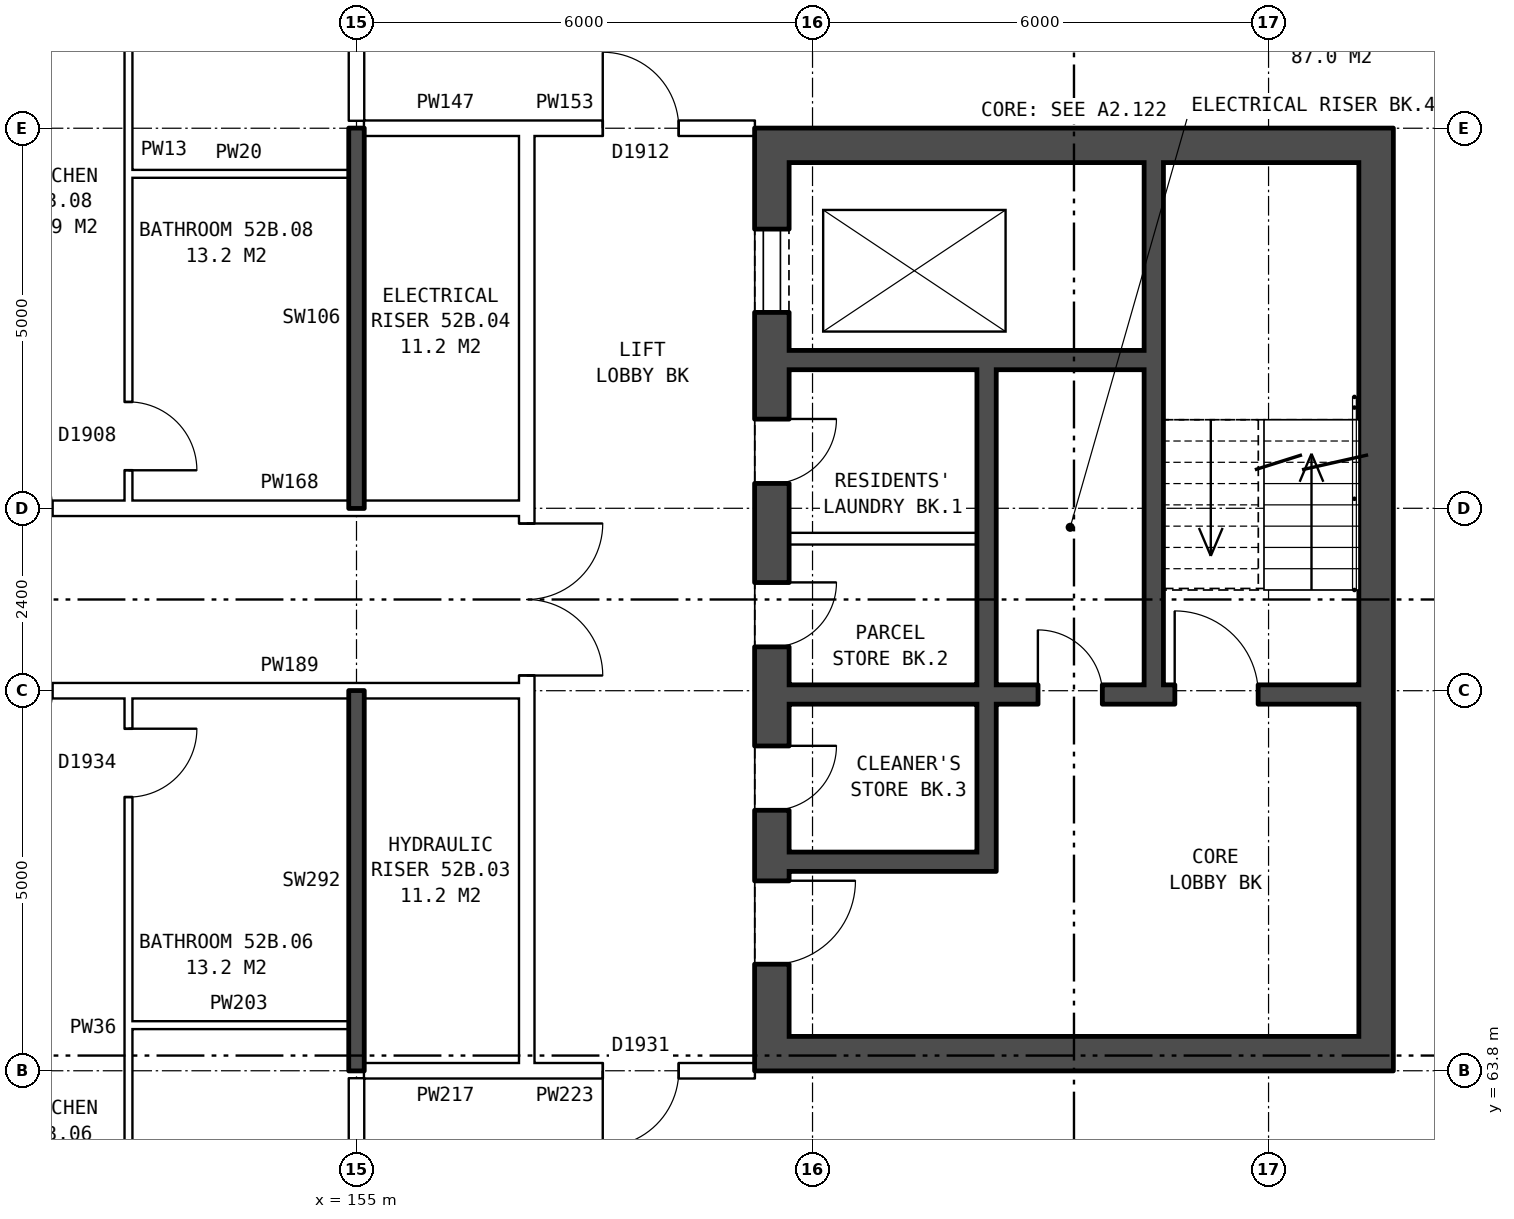
"""IFC4 building model, lengths in metres.
Left out: names, types, materials, properties, quantities, classifications, styles, units other than length and angle.
Written with IfcOpenShell. Run it as: python <this file> out.ifc"""

import sys

from ifc_helpers import new_model, si_unit, direction, frame, frame_2d, origin, place, context, subcontext, project, spatial, rectangle, extrude, element, fill, save


model = new_model("IFC4")
c1 = context("Model", 3, precision=1e-05, world=origin(), true_north=direction((0.0, 1.0)))
c2 = subcontext(c1, "Body", "Model", "MODEL_VIEW")
j1 = project(units=[si_unit("LENGTHUNIT", "METRE"), si_unit("PLANEANGLEUNIT", "RADIAN")], contexts=[c1])
p1 = place(None, origin())
s1 = spatial("IfcSite", under=j1, at=p1, CompositionType="ELEMENT")
p2 = place(p1, origin())
s2 = spatial("IfcBuilding", under=s1, at=p2, CompositionType="ELEMENT")
p3 = place(p2, frame((0.0, 0.0, 185.1)))
s3 = spatial("IfcBuildingStorey", under=s2, at=p3, CompositionType="ELEMENT", Elevation=185.1)
p4 = place(p3, frame((160.465, 76.2, 0.0), z_axis=(0.0, 0.0, 1.0), x_axis=(0.0, -1.0, 0.0)))
e1 = element("IfcWall", 1, at=p4, inside=s3, PredefinedType="SHEAR", context=c2, shape_type="SweptSolid", body=[
    extrude(rectangle(XDim=12.4, YDim=0.45, at=frame_2d((6.2, 0.0))), origin(), (0.0, 0.0, 1.0), 2.85),
])
p5 = place(p4, frame((1.325, 0.0, 0.0)))
e2 = element("IfcOpeningElement", 2, at=p5, cuts=e1, PredefinedType="OPENING", context=c2, shape_type="SweptSolid", body=[
    extrude(rectangle(XDim=1.1, YDim=2.1, at=frame_2d((0.55, 1.05))), frame((0.0, 0.235, 0.0), z_axis=(0.0, -1.0, 0.0), x_axis=(1.0, 0.0, 0.0)), (0.0, 0.0, 1.0), 0.47),
])
p6 = place(p4, frame((3.825, 0.0, 0.0)))
e3 = element("IfcOpeningElement", 3, at=p6, cuts=e1, PredefinedType="OPENING", context=c2, shape_type="SweptSolid", body=[
    extrude(rectangle(XDim=0.85, YDim=2.1, at=frame_2d((0.425, 1.05))), frame((0.0, 0.235, 0.0), z_axis=(0.0, -1.0, 0.0), x_axis=(1.0, 0.0, 0.0)), (0.0, 0.0, 1.0), 0.47),
])
p7 = place(p4, frame((5.975, 0.0, 0.0)))
e4 = element("IfcOpeningElement", 4, at=p7, cuts=e1, PredefinedType="OPENING", context=c2, shape_type="SweptSolid", body=[
    extrude(rectangle(XDim=0.85, YDim=2.1, at=frame_2d((0.425, 1.05))), frame((0.0, 0.235, 0.0), z_axis=(0.0, -1.0, 0.0), x_axis=(1.0, 0.0, 0.0)), (0.0, 0.0, 1.0), 0.47),
])
p8 = place(p4, frame((9.9, 0.0, 0.0)))
e5 = element("IfcOpeningElement", 5, at=p8, cuts=e1, PredefinedType="OPENING", context=c2, shape_type="SweptSolid", body=[
    extrude(rectangle(XDim=1.1, YDim=2.1, at=frame_2d((0.55, 1.05))), frame((0.0, 0.235, 0.0), z_axis=(0.0, -1.0, 0.0), x_axis=(1.0, 0.0, 0.0)), (0.0, 0.0, 1.0), 0.47),
])
p9 = place(p4, frame((8.125, 0.0, 0.0)))
e6 = element("IfcOpeningElement", 6, at=p9, cuts=e1, PredefinedType="OPENING", context=c2, shape_type="SweptSolid", body=[
    extrude(rectangle(XDim=0.85, YDim=2.1, at=frame_2d((0.425, 1.05))), frame((0.0, 0.235, 0.0), z_axis=(0.0, -1.0, 0.0), x_axis=(1.0, 0.0, 0.0)), (0.0, 0.0, 1.0), 0.47),
])
p10 = place(p3, frame((168.415, 76.2, 0.0), z_axis=(0.0, 0.0, 1.0), x_axis=(0.0, -1.0, 0.0)))
e7 = element("IfcWall", 7, at=p10, inside=s3, PredefinedType="SHEAR", context=c2, shape_type="SweptSolid", body=[
    extrude(rectangle(XDim=12.4, YDim=0.45, at=frame_2d((6.2, 0.0))), origin(), (0.0, 0.0, 1.0), 2.85),
])
for number, where, z_axis, x_axis in (
    (8, (160.69, 75.975, 0.0), (0.0, 0.0, 1.0), (1.0, 0.0, 0.0)),
    (9, (160.69, 64.025, 0.0), (0.0, 0.0, 1.0), (1.0, 0.0, 0.0)),
):
    element("IfcWall", number, at=place(p3, frame(where, z_axis=z_axis, x_axis=x_axis)), inside=s3, PredefinedType="SHEAR", context=c2, shape_type="SweptSolid", body=[
        extrude(rectangle(XDim=7.5, YDim=0.45, at=frame_2d((3.75, 0.0))), origin(), (0.0, 0.0, 1.0), 2.85),
    ])
p11 = place(p3, frame((160.69, 73.15, 0.0), z_axis=(0.0, 0.0, 1.0), x_axis=(1.0, 0.0, 0.0)))
e10 = element("IfcWall", 10, at=p11, inside=s3, PredefinedType="SHEAR", context=c2, shape_type="SweptSolid", body=[
    extrude(rectangle(XDim=4.675, YDim=0.25, at=frame_2d((2.337, 0.0))), origin(), (0.0, 0.0, 1.0), 2.85),
])
p12 = place(p3, frame((160.69, 70.8, 0.0), z_axis=(0.0, 0.0, 1.0), x_axis=(1.0, 0.0, 0.0)))
e11 = element("IfcWall", 11, at=p12, inside=s3, PredefinedType="PARTITIONING", context=c2, shape_type="SweptSolid", body=[
    extrude(rectangle(XDim=2.475, YDim=0.15, at=frame_2d((1.238, 0.0))), origin(), (0.0, 0.0, 1.0), 2.85),
])
p13 = place(p3, frame((160.69, 68.75, 0.0), z_axis=(0.0, 0.0, 1.0), x_axis=(1.0, 0.0, 0.0)))
e12 = element("IfcWall", 12, at=p13, inside=s3, PredefinedType="SHEAR", context=c2, shape_type="SweptSolid", body=[
    extrude(rectangle(XDim=7.5, YDim=0.25, at=frame_2d((3.75, 0.0))), origin(), (0.0, 0.0, 1.0), 2.85),
])
p14 = place(p13, frame((5.075, 0.0, 0.0)))
e13 = element("IfcOpeningElement", 13, at=p14, cuts=e12, PredefinedType="OPENING", context=c2, shape_type="SweptSolid", body=[
    extrude(rectangle(XDim=1.1, YDim=2.1, at=frame_2d((0.55, 1.05))), frame((0.0, 0.135, 0.0), z_axis=(0.0, -1.0, 0.0), x_axis=(1.0, 0.0, 0.0)), (0.0, 0.0, 1.0), 0.27),
])
p15 = place(p13, frame((3.275, 0.0, 0.0)))
e14 = element("IfcOpeningElement", 14, at=p15, cuts=e12, PredefinedType="OPENING", context=c2, shape_type="SweptSolid", body=[
    extrude(rectangle(XDim=0.85, YDim=2.1, at=frame_2d((0.425, 1.05))), frame((0.0, 0.135, 0.0), z_axis=(0.0, -1.0, 0.0), x_axis=(1.0, 0.0, 0.0)), (0.0, 0.0, 1.0), 0.27),
])
p16 = place(p3, frame((160.69, 66.55, 0.0), z_axis=(0.0, 0.0, 1.0), x_axis=(1.0, 0.0, 0.0)))
e15 = element("IfcWall", 15, at=p16, inside=s3, PredefinedType="SHEAR", context=c2, shape_type="SweptSolid", body=[
    extrude(rectangle(XDim=2.475, YDim=0.25, at=frame_2d((1.238, 0.0))), origin(), (0.0, 0.0, 1.0), 2.85),
])
p17 = place(p3, frame((163.29, 73.025, 0.0), z_axis=(0.0, 0.0, 1.0), x_axis=(0.0, -1.0, 0.0)))
e16 = element("IfcWall", 16, at=p17, inside=s3, PredefinedType="SHEAR", context=c2, shape_type="SweptSolid", body=[
    extrude(rectangle(XDim=4.15, YDim=0.25, at=frame_2d((2.075, 0.0))), origin(), (0.0, 0.0, 1.0), 2.85),
])
p18 = place(p3, frame((163.29, 68.625, 0.0), z_axis=(0.0, 0.0, 1.0), x_axis=(0.0, -1.0, 0.0)))
e17 = element("IfcWall", 17, at=p18, inside=s3, PredefinedType="SHEAR", context=c2, shape_type="SweptSolid", body=[
    extrude(rectangle(XDim=2.2, YDim=0.25, at=frame_2d((1.1, 0.0))), origin(), (0.0, 0.0, 1.0), 2.85),
])
p19 = place(p3, frame((165.49, 75.75, 0.0), z_axis=(0.0, 0.0, 1.0), x_axis=(0.0, -1.0, 0.0)))
e18 = element("IfcWall", 18, at=p19, inside=s3, PredefinedType="SHEAR", context=c2, shape_type="SweptSolid", body=[
    extrude(rectangle(XDim=6.875, YDim=0.25, at=frame_2d((3.438, 0.0))), origin(), (0.0, 0.0, 1.0), 2.85),
])
p20 = place(p3, frame((157.24, 63.9, 0.0), z_axis=(0.0, 0.0, 1.0), x_axis=(0.0, 1.0, 0.0)))
e19 = element("IfcWall", 19, at=p20, inside=s3, PredefinedType="PARTITIONING", context=c2, shape_type="SweptSolid", body=[
    extrude(rectangle(XDim=12.2, YDim=0.2, at=frame_2d((6.1, 0.0))), origin(), (0.0, 0.0, 1.0), 2.85),
])
p21 = place(p20, frame((5.1, 0.0, 0.0)))
e20 = element("IfcOpeningElement", 20, at=p21, cuts=e19, PredefinedType="OPENING", context=c2, shape_type="SweptSolid", body=[
    extrude(rectangle(XDim=2.0, YDim=2.1, at=frame_2d((1.0, 1.05))), frame((0.0, 0.11, 0.0), z_axis=(0.0, -1.0, 0.0), x_axis=(1.0, 0.0, 0.0)), (0.0, 0.0, 1.0), 0.22),
])
p22 = place(p3, frame((155.1, 63.8, 0.0), z_axis=(0.0, 0.0, 1.0), x_axis=(1.0, 0.0, 0.0)))
e21 = element("IfcWall", 21, at=p22, inside=s3, PredefinedType="PARTITIONING", context=c2, shape_type="SweptSolid", body=[
    extrude(rectangle(XDim=2.14, YDim=0.2, at=frame_2d((1.07, 0.0))), origin(), (0.0, 0.0, 1.0), 2.85),
])
p23 = place(p3, frame((157.24, 63.8, 0.0), z_axis=(0.0, 0.0, 1.0), x_axis=(1.0, 0.0, 0.0)))
e22 = element("IfcWall", 22, at=p23, inside=s3, PredefinedType="PARTITIONING", context=c2, shape_type="SweptSolid", body=[
    extrude(rectangle(XDim=3.0, YDim=0.2, at=frame_2d((1.5, 0.0))), origin(), (0.0, 0.0, 1.0), 2.85),
])
p24 = place(p23, frame((1.0, 0.0, 0.0)))
e23 = element("IfcOpeningElement", 23, at=p24, cuts=e22, PredefinedType="OPENING", context=c2, shape_type="SweptSolid", body=[
    extrude(rectangle(XDim=1.0, YDim=2.1, at=frame_2d((0.5, 1.05))), frame((0.0, 0.11, 0.0), z_axis=(0.0, -1.0, 0.0), x_axis=(1.0, 0.0, 0.0)), (0.0, 0.0, 1.0), 0.22),
])
p25 = place(p3, frame((152.0, 64.4, 0.0), z_axis=(0.0, 0.0, 1.0), x_axis=(1.0, 0.0, 0.0)))
e24 = element("IfcWall", 24, at=p25, inside=s3, PredefinedType="PARTITIONING", context=c2, shape_type="SweptSolid", body=[
    extrude(rectangle(XDim=2.9, YDim=0.1, at=frame_2d((1.45, 0.0))), origin(), (0.0, 0.0, 1.0), 2.85),
])
p26 = place(p3, frame((142.76, 68.8, 0.0), z_axis=(0.0, 0.0, 1.0), x_axis=(1.0, 0.0, 0.0)))
e25 = element("IfcWall", 25, at=p26, inside=s3, PredefinedType="PARTITIONING", context=c2, shape_type="SweptSolid", body=[
    extrude(rectangle(XDim=14.48, YDim=0.2, at=frame_2d((7.24, 0.0))), origin(), (0.0, 0.0, 1.0), 2.85),
])
p27 = place(p26, frame((1.12, 0.0, 0.0)))
e26 = element("IfcOpeningElement", 26, at=p27, cuts=e25, PredefinedType="OPENING", context=c2, shape_type="SweptSolid", body=[
    extrude(rectangle(XDim=1.0, YDim=2.1, at=frame_2d((0.5, 1.05))), frame((0.0, 0.11, 0.0), z_axis=(0.0, -1.0, 0.0), x_axis=(1.0, 0.0, 0.0)), (0.0, 0.0, 1.0), 0.22),
])
p28 = place(p26, frame((7.24, 0.0, 0.0)))
e27 = element("IfcOpeningElement", 27, at=p28, cuts=e25, PredefinedType="OPENING", context=c2, shape_type="SweptSolid", body=[
    extrude(rectangle(XDim=1.0, YDim=2.1, at=frame_2d((0.5, 1.05))), frame((0.0, 0.11, 0.0), z_axis=(0.0, -1.0, 0.0), x_axis=(1.0, 0.0, 0.0)), (0.0, 0.0, 1.0), 0.22),
])
p29 = place(p3, frame((142.76, 71.2, 0.0), z_axis=(0.0, 0.0, 1.0), x_axis=(1.0, 0.0, 0.0)))
e28 = element("IfcWall", 28, at=p29, inside=s3, PredefinedType="PARTITIONING", context=c2, shape_type="SweptSolid", body=[
    extrude(rectangle(XDim=14.48, YDim=0.2, at=frame_2d((7.24, 0.0))), origin(), (0.0, 0.0, 1.0), 2.85),
])
p30 = place(p29, frame((4.24, 0.0, 0.0)))
e29 = element("IfcOpeningElement", 29, at=p30, cuts=e28, PredefinedType="OPENING", context=c2, shape_type="SweptSolid", body=[
    extrude(rectangle(XDim=1.0, YDim=2.1, at=frame_2d((0.5, 1.05))), frame((0.0, 0.11, 0.0), z_axis=(0.0, -1.0, 0.0), x_axis=(1.0, 0.0, 0.0)), (0.0, 0.0, 1.0), 0.22),
])
p31 = place(p29, frame((7.24, 0.0, 0.0)))
e30 = element("IfcOpeningElement", 30, at=p31, cuts=e28, PredefinedType="OPENING", context=c2, shape_type="SweptSolid", body=[
    extrude(rectangle(XDim=1.0, YDim=2.1, at=frame_2d((0.5, 1.05))), frame((0.0, 0.11, 0.0), z_axis=(0.0, -1.0, 0.0), x_axis=(1.0, 0.0, 0.0)), (0.0, 0.0, 1.0), 0.22),
])
p32 = place(p3, frame((152.0, 75.6, 0.0), z_axis=(0.0, 0.0, 1.0), x_axis=(1.0, 0.0, 0.0)))
e31 = element("IfcWall", 31, at=p32, inside=s3, PredefinedType="PARTITIONING", context=c2, shape_type="SweptSolid", body=[
    extrude(rectangle(XDim=2.9, YDim=0.1, at=frame_2d((1.45, 0.0))), origin(), (0.0, 0.0, 1.0), 2.85),
])
p33 = place(p3, frame((155.1, 76.2, 0.0), z_axis=(0.0, 0.0, 1.0), x_axis=(1.0, 0.0, 0.0)))
e32 = element("IfcWall", 32, at=p33, inside=s3, PredefinedType="PARTITIONING", context=c2, shape_type="SweptSolid", body=[
    extrude(rectangle(XDim=2.14, YDim=0.2, at=frame_2d((1.07, 0.0))), origin(), (0.0, 0.0, 1.0), 2.85),
])
p34 = place(p3, frame((157.24, 76.2, 0.0), z_axis=(0.0, 0.0, 1.0), x_axis=(1.0, 0.0, 0.0)))
e33 = element("IfcWall", 33, at=p34, inside=s3, PredefinedType="PARTITIONING", context=c2, shape_type="SweptSolid", body=[
    extrude(rectangle(XDim=3.0, YDim=0.2, at=frame_2d((1.5, 0.0))), origin(), (0.0, 0.0, 1.0), 2.85),
])
p35 = place(p34, frame((1.0, 0.0, 0.0)))
e34 = element("IfcOpeningElement", 34, at=p35, cuts=e33, PredefinedType="OPENING", context=c2, shape_type="SweptSolid", body=[
    extrude(rectangle(XDim=1.0, YDim=2.1, at=frame_2d((0.5, 1.05))), frame((0.0, 0.11, 0.0), z_axis=(0.0, -1.0, 0.0), x_axis=(1.0, 0.0, 0.0)), (0.0, 0.0, 1.0), 0.22),
])
p36 = place(p3, frame((152.0, 54.36, 0.0), z_axis=(0.0, 0.0, 1.0), x_axis=(0.0, 1.0, 0.0)))
e35 = element("IfcWall", 35, at=p36, inside=s3, PredefinedType="PARTITIONING", context=c2, shape_type="SweptSolid", body=[
    extrude(rectangle(XDim=14.34, YDim=0.1, at=frame_2d((7.17, 0.0))), origin(), (0.0, 0.0, 1.0), 2.85),
])
p37 = place(p36, frame((5.5, 0.0, 0.0)))
e36 = element("IfcOpeningElement", 36, at=p37, cuts=e35, PredefinedType="OPENING", context=c2, shape_type="SweptSolid", body=[
    extrude(rectangle(XDim=0.9, YDim=2.1, at=frame_2d((0.45, 1.05))), frame((0.0, 0.06, 0.0), z_axis=(0.0, -1.0, 0.0), x_axis=(1.0, 0.0, 0.0)), (0.0, 0.0, 1.0), 0.12),
])
p38 = place(p36, frame((13.04, 0.0, 0.0)))
e37 = element("IfcOpeningElement", 37, at=p38, cuts=e35, PredefinedType="OPENING", context=c2, shape_type="SweptSolid", body=[
    extrude(rectangle(XDim=0.9, YDim=2.1, at=frame_2d((0.45, 1.05))), frame((0.0, 0.06, 0.0), z_axis=(0.0, -1.0, 0.0), x_axis=(1.0, 0.0, 0.0)), (0.0, 0.0, 1.0), 0.12),
])
p39 = place(p3, frame((152.0, 71.3, 0.0), z_axis=(0.0, 0.0, 1.0), x_axis=(0.0, 1.0, 0.0)))
e38 = element("IfcWall", 38, at=p39, inside=s3, PredefinedType="PARTITIONING", context=c2, shape_type="SweptSolid", body=[
    extrude(rectangle(XDim=14.34, YDim=0.1, at=frame_2d((7.17, 0.0))), origin(), (0.0, 0.0, 1.0), 2.85),
])
p40 = place(p39, frame((7.94, 0.0, 0.0)))
e39 = element("IfcOpeningElement", 39, at=p40, cuts=e38, PredefinedType="OPENING", context=c2, shape_type="SweptSolid", body=[
    extrude(rectangle(XDim=0.9, YDim=2.1, at=frame_2d((0.45, 1.05))), frame((0.0, 0.06, 0.0), z_axis=(0.0, -1.0, 0.0), x_axis=(1.0, 0.0, 0.0)), (0.0, 0.0, 1.0), 0.12),
])
p41 = place(p39, frame((0.4, 0.0, 0.0)))
e40 = element("IfcOpeningElement", 40, at=p41, cuts=e38, PredefinedType="OPENING", context=c2, shape_type="SweptSolid", body=[
    extrude(rectangle(XDim=0.9, YDim=2.1, at=frame_2d((0.45, 1.05))), frame((0.0, 0.06, 0.0), z_axis=(0.0, -1.0, 0.0), x_axis=(1.0, 0.0, 0.0)), (0.0, 0.0, 1.0), 0.12),
])
p42 = place(p3, frame((155.0, 61.5, 0.0), z_axis=(0.0, 0.0, 1.0), x_axis=(0.0, 1.0, 0.0)))
e41 = element("IfcWall", 41, at=p42, inside=s3, PredefinedType="PARTITIONING", context=c2, shape_type="SweptSolid", body=[
    extrude(rectangle(XDim=2.2, YDim=0.2, at=frame_2d((1.1, 0.0))), origin(), (0.0, 0.0, 1.0), 2.85),
])
for number, where, z_axis, x_axis in (
    (42, (155.0, 63.8, 0.0), (0.0, 0.0, 1.0), (0.0, 1.0, 0.0)),
    (43, (155.0, 71.2, 0.0), (0.0, 0.0, 1.0), (0.0, 1.0, 0.0)),
):
    element("IfcWall", number, at=place(p3, frame(where, z_axis=z_axis, x_axis=x_axis)), inside=s3, PredefinedType="SOLIDWALL", context=c2, shape_type="SweptSolid", body=[
        extrude(rectangle(XDim=5.0, YDim=0.2, at=frame_2d((2.5, 0.0))), origin(), (0.0, 0.0, 1.0), 2.85),
    ])
p43 = place(p3, frame((155.0, 76.3, 0.0), z_axis=(0.0, 0.0, 1.0), x_axis=(0.0, 1.0, 0.0)))
e44 = element("IfcWall", 44, at=p43, inside=s3, PredefinedType="PARTITIONING", context=c2, shape_type="SweptSolid", body=[
    extrude(rectangle(XDim=2.2, YDim=0.2, at=frame_2d((1.1, 0.0))), origin(), (0.0, 0.0, 1.0), 2.85),
])
p44 = place(p5, origin())
e45 = element("IfcDoor", 45, at=p44, inside=s3, OperationType="DOUBLE_DOOR_SLIDING", PredefinedType="DOOR", context=c2, shape_type="SweptSolid", body=[
    extrude(rectangle(XDim=1.1, YDim=2.1, at=frame_2d((0.55, 1.05))), frame((0.0, 0.21, 0.0), z_axis=(0.0, -1.0, 0.0), x_axis=(1.0, 0.0, 0.0)), (0.0, 0.0, 1.0), 0.05),
])
fill(e2, e45)
p45 = place(p6, origin())
e46 = element("IfcDoor", 46, at=p45, inside=s3, OperationType="SINGLE_SWING_LEFT", PredefinedType="DOOR", context=c2, shape_type="SweptSolid", body=[
    extrude(rectangle(XDim=0.85, YDim=2.1, at=frame_2d((0.425, 1.05))), frame((0.0, 0.21, 0.0), z_axis=(0.0, -1.0, 0.0), x_axis=(1.0, 0.0, 0.0)), (0.0, 0.0, 1.0), 0.05),
])
fill(e3, e46)
p46 = place(p7, origin())
e47 = element("IfcDoor", 47, at=p46, inside=s3, OperationType="SINGLE_SWING_LEFT", PredefinedType="DOOR", context=c2, shape_type="SweptSolid", body=[
    extrude(rectangle(XDim=0.85, YDim=2.1, at=frame_2d((0.425, 1.05))), frame((0.0, 0.21, 0.0), z_axis=(0.0, -1.0, 0.0), x_axis=(1.0, 0.0, 0.0)), (0.0, 0.0, 1.0), 0.05),
])
fill(e4, e47)
p47 = place(p8, origin())
e48 = element("IfcDoor", 48, at=p47, inside=s3, OperationType="SINGLE_SWING_LEFT", PredefinedType="DOOR", context=c2, shape_type="SweptSolid", body=[
    extrude(rectangle(XDim=1.1, YDim=2.1, at=frame_2d((0.55, 1.05))), frame((0.0, 0.21, 0.0), z_axis=(0.0, -1.0, 0.0), x_axis=(1.0, 0.0, 0.0)), (0.0, 0.0, 1.0), 0.05),
])
fill(e5, e48)
p48 = place(p14, origin())
e49 = element("IfcDoor", 49, at=p48, inside=s3, OperationType="SINGLE_SWING_LEFT", PredefinedType="DOOR", context=c2, shape_type="SweptSolid", body=[
    extrude(rectangle(XDim=1.1, YDim=2.1, at=frame_2d((0.55, 1.05))), frame((0.0, 0.025, 0.0), z_axis=(0.0, -1.0, 0.0), x_axis=(1.0, 0.0, 0.0)), (0.0, 0.0, 1.0), 0.05),
])
fill(e13, e49)
p49 = place(p9, origin())
e50 = element("IfcDoor", 50, at=p49, inside=s3, OperationType="SINGLE_SWING_LEFT", PredefinedType="DOOR", context=c2, shape_type="SweptSolid", body=[
    extrude(rectangle(XDim=0.85, YDim=2.1, at=frame_2d((0.425, 1.05))), frame((0.0, 0.21, 0.0), z_axis=(0.0, -1.0, 0.0), x_axis=(1.0, 0.0, 0.0)), (0.0, 0.0, 1.0), 0.05),
])
fill(e6, e50)
p50 = place(p15, origin())
e51 = element("IfcDoor", 51, at=p50, inside=s3, OperationType="SINGLE_SWING_LEFT", PredefinedType="DOOR", context=c2, shape_type="SweptSolid", body=[
    extrude(rectangle(XDim=0.85, YDim=2.1, at=frame_2d((0.425, 1.05))), frame((0.0, 0.025, 0.0), z_axis=(0.0, -1.0, 0.0), x_axis=(1.0, 0.0, 0.0)), (0.0, 0.0, 1.0), 0.05),
])
fill(e14, e51)
p51 = place(p21, frame((2.0, 0.0, 0.0), z_axis=(0.0, 0.0, 1.0), x_axis=(-1.0, 0.0, 0.0)))
e52 = element("IfcDoor", 52, at=p51, inside=s3, OperationType="DOUBLE_DOOR_SINGLE_SWING", PredefinedType="DOOR", context=c2, shape_type="SweptSolid", body=[
    extrude(rectangle(XDim=2.0, YDim=2.1, at=frame_2d((1.0, 1.05))), frame((0.0, 0.025, 0.0), z_axis=(0.0, -1.0, 0.0), x_axis=(1.0, 0.0, 0.0)), (0.0, 0.0, 1.0), 0.05),
])
fill(e20, e52)
p52 = place(p24, frame((1.0, 0.0, 0.0), z_axis=(0.0, 0.0, 1.0), x_axis=(-1.0, 0.0, 0.0)))
e53 = element("IfcDoor", 53, at=p52, inside=s3, OperationType="SINGLE_SWING_RIGHT", PredefinedType="DOOR", context=c2, shape_type="SweptSolid", body=[
    extrude(rectangle(XDim=1.0, YDim=2.1, at=frame_2d((0.5, 1.05))), frame((0.0, 0.025, 0.0), z_axis=(0.0, -1.0, 0.0), x_axis=(1.0, 0.0, 0.0)), (0.0, 0.0, 1.0), 0.05),
])
fill(e23, e53)
p53 = place(p35, origin())
e54 = element("IfcDoor", 54, at=p53, inside=s3, OperationType="SINGLE_SWING_LEFT", PredefinedType="DOOR", context=c2, shape_type="SweptSolid", body=[
    extrude(rectangle(XDim=1.0, YDim=2.1, at=frame_2d((0.5, 1.05))), frame((0.0, 0.025, 0.0), z_axis=(0.0, -1.0, 0.0), x_axis=(1.0, 0.0, 0.0)), (0.0, 0.0, 1.0), 0.05),
])
fill(e34, e54)
p54 = place(p38, frame((0.9, 0.0, 0.0), z_axis=(0.0, 0.0, 1.0), x_axis=(-1.0, 0.0, 0.0)))
e55 = element("IfcDoor", 55, at=p54, inside=s3, OperationType="SINGLE_SWING_LEFT", PredefinedType="DOOR", context=c2, shape_type="SweptSolid", body=[
    extrude(rectangle(XDim=0.9, YDim=2.1, at=frame_2d((0.45, 1.05))), frame((0.0, 0.025, 0.0), z_axis=(0.0, -1.0, 0.0), x_axis=(1.0, 0.0, 0.0)), (0.0, 0.0, 1.0), 0.05),
])
fill(e37, e55)
p55 = place(p41, frame((0.9, 0.0, 0.0), z_axis=(0.0, 0.0, 1.0), x_axis=(-1.0, 0.0, 0.0)))
e56 = element("IfcDoor", 56, at=p55, inside=s3, OperationType="SINGLE_SWING_RIGHT", PredefinedType="DOOR", context=c2, shape_type="SweptSolid", body=[
    extrude(rectangle(XDim=0.9, YDim=2.1, at=frame_2d((0.45, 1.05))), frame((0.0, 0.025, 0.0), z_axis=(0.0, -1.0, 0.0), x_axis=(1.0, 0.0, 0.0)), (0.0, 0.0, 1.0), 0.05),
])
fill(e40, e56)
save(model, sys.argv[1])
